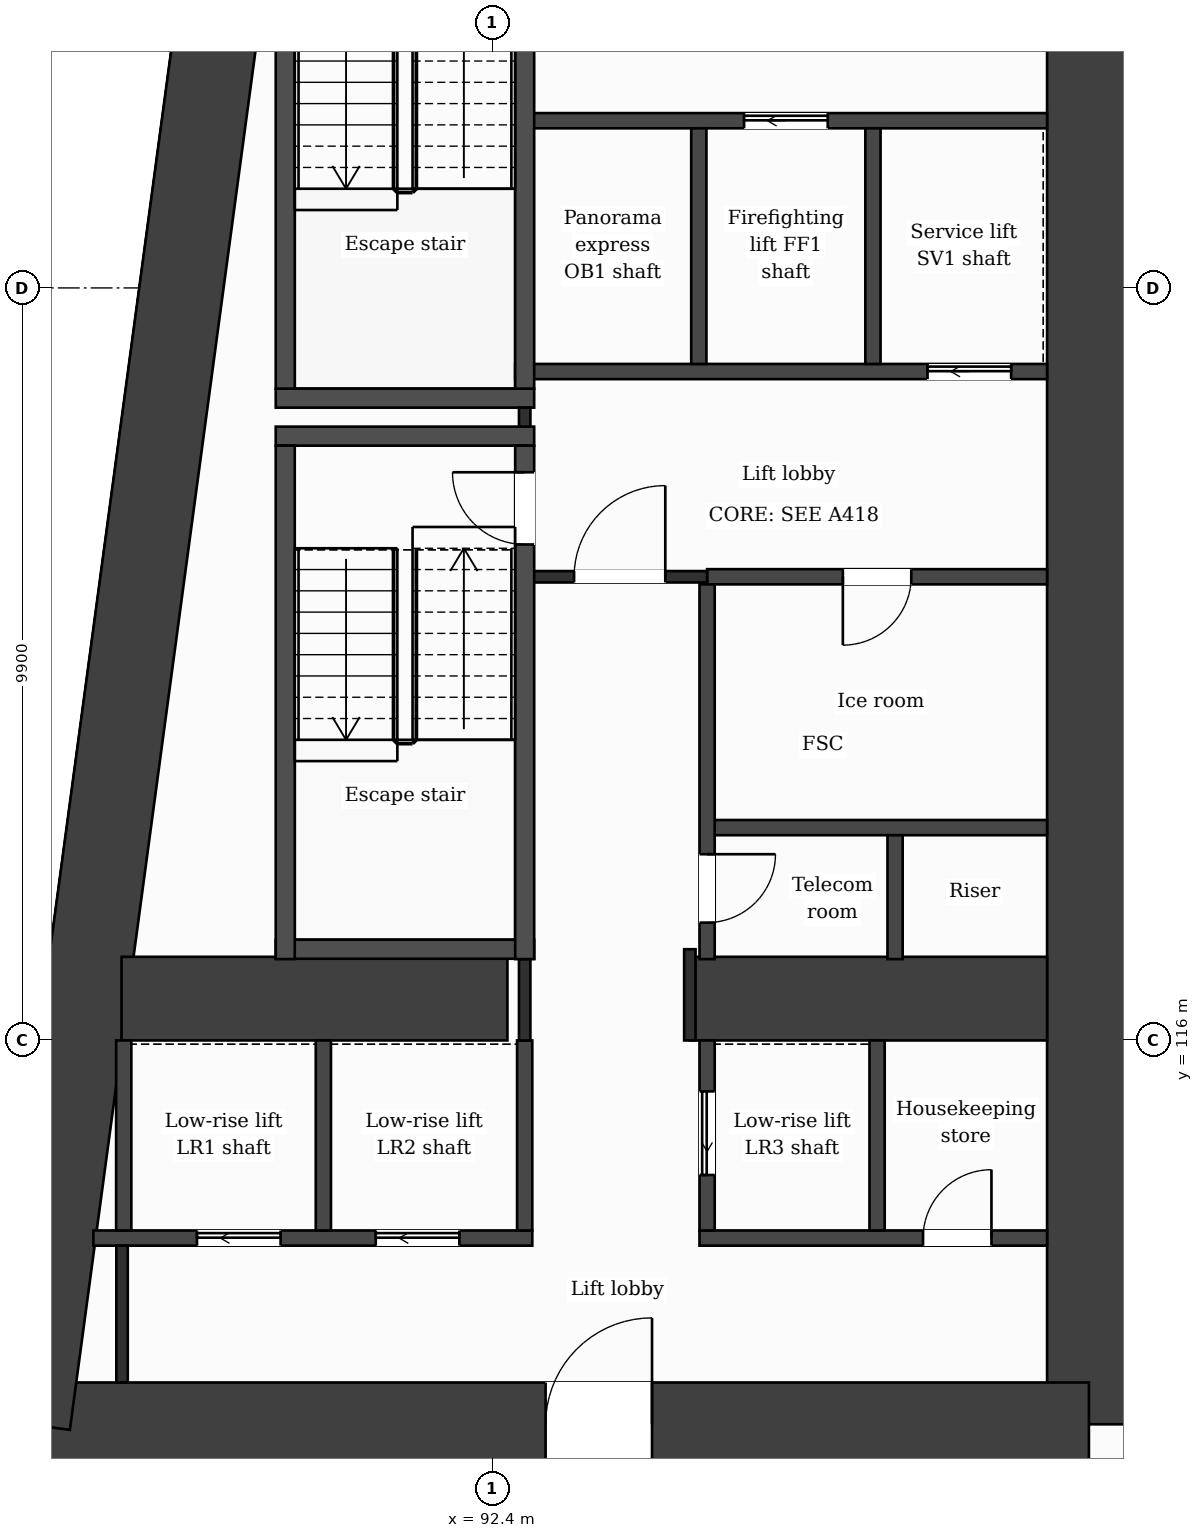
"""IFC4 building model, lengths in metres.
Left out: names, types, materials, properties, quantities, classifications, styles, units other than length and angle.
Written with IfcOpenShell. Run it as: python <this file> out.ifc"""

import sys

from ifc_helpers import new_model, si_unit, direction, frame, frame_2d, origin, place, context, subcontext, project, spatial, rectangle, extrude, element, fill, save


model = new_model("IFC4")
c1 = context("Model", 3, precision=1e-05, world=origin(), true_north=direction((0.0, 1.0)))
c2 = subcontext(c1, "Body", "Model", "MODEL_VIEW")
j1 = project(units=[si_unit("LENGTHUNIT", "METRE"), si_unit("PLANEANGLEUNIT", "RADIAN")], contexts=[c1])
p1 = place(None, origin())
s1 = spatial("IfcSite", under=j1, at=p1, CompositionType="ELEMENT")
p2 = place(p1, origin())
s2 = spatial("IfcBuilding", under=s1, at=p2, CompositionType="ELEMENT")
p3 = place(p2, frame((0.0, 0.0, 77.5)))
s3 = spatial("IfcBuildingStorey", under=s2, at=p3, CompositionType="ELEMENT", Elevation=77.5)
p4 = place(p3, frame((100.25, 131.85, 0.0), z_axis=(0.0, 0.0, 1.0), x_axis=(0.0, -1.0, 0.0)))
e1 = element("IfcWall", 1, at=p4, inside=s3, PredefinedType="SHEAR", context=c2, shape_type="SweptSolid", body=[
    extrude(rectangle(XDim=20.9, YDim=1.1, at=frame_2d((10.45, 0.0))), origin(), (0.0, 0.0, 1.0), 3.5),
])
p5 = place(p3, frame((100.25, 110.95, 0.0), z_axis=(0.0, 0.0, 1.0), x_axis=(-1.0, 0.0, 0.0)))
e2 = element("IfcWall", 2, at=p5, inside=s3, PredefinedType="SHEAR", context=c2, shape_type="SweptSolid", body=[
    extrude(rectangle(XDim=13.952, YDim=1.1, at=frame_2d((6.976, 0.0))), origin(), (0.0, 0.0, 1.0), 3.5),
])
p6 = place(p5, frame((5.748, 0.0, 0.0)))
e3 = element("IfcOpeningElement", 3, at=p6, cuts=e2, PredefinedType="OPENING", context=c2, shape_type="SweptSolid", body=[
    extrude(rectangle(XDim=1.4, YDim=2.1, at=frame_2d((0.7, 1.05))), frame((0.0, 0.56, 0.0), z_axis=(0.0, -1.0, 0.0), x_axis=(1.0, 0.0, 0.0)), (0.0, 0.0, 1.0), 1.12),
])
p7 = place(p3, frame((86.298, 110.95, 0.0), z_axis=(0.0, 0.0, 1.0), x_axis=(0.133400422634, 0.99106222168, 0.0)))
e4 = element("IfcWall", 4, at=p7, inside=s3, PredefinedType="SHEAR", context=c2, shape_type="SweptSolid", body=[
    extrude(rectangle(XDim=21.089, YDim=1.1, at=frame_2d((10.544, 0.0))), origin(), (0.0, 0.0, 1.0), 3.5),
])
p8 = place(p3, frame((87.523, 116.55, 0.0), z_axis=(0.0, 0.0, 1.0), x_axis=(1.0, 0.0, 0.0)))
e5 = element("IfcWall", 5, at=p8, inside=s3, PredefinedType="SHEAR", context=c2, shape_type="SweptSolid", body=[
    extrude(rectangle(XDim=5.077, YDim=1.1, at=frame_2d((2.539, 0.0))), origin(), (0.0, 0.0, 1.0), 3.5),
])
p9 = place(p3, frame((95.0, 116.55, 0.0), z_axis=(0.0, 0.0, 1.0), x_axis=(1.0, 0.0, 0.0)))
e6 = element("IfcWall", 6, at=p9, inside=s3, PredefinedType="SHEAR", context=c2, shape_type="SweptSolid", body=[
    extrude(rectangle(XDim=4.7, YDim=1.1, at=frame_2d((2.35, 0.0))), origin(), (0.0, 0.0, 1.0), 3.5),
])
p10 = place(p3, frame((87.153, 113.4, 0.0), z_axis=(0.0, 0.0, 1.0), x_axis=(1.0, 0.0, 0.0)))
e7 = element("IfcWall", 7, at=p10, inside=s3, PredefinedType="PARTITIONING", context=c2, shape_type="SweptSolid", body=[
    extrude(rectangle(XDim=5.774, YDim=0.2, at=frame_2d((2.887, 0.0))), origin(), (0.0, 0.0, 1.0), 3.0),
])
p11 = place(p10, frame((1.363, 0.0, 0.0)))
e8 = element("IfcOpeningElement", 8, at=p11, cuts=e7, PredefinedType="OPENING", context=c2, shape_type="SweptSolid", body=[
    extrude(rectangle(XDim=1.1, YDim=2.1, at=frame_2d((0.55, 1.05))), frame((0.0, 0.11, 0.0), z_axis=(0.0, -1.0, 0.0), x_axis=(1.0, 0.0, 0.0)), (0.0, 0.0, 1.0), 0.22),
])
p12 = place(p10, frame((3.715, 0.0, 0.0)))
e9 = element("IfcOpeningElement", 9, at=p12, cuts=e7, PredefinedType="OPENING", context=c2, shape_type="SweptSolid", body=[
    extrude(rectangle(XDim=1.1, YDim=2.1, at=frame_2d((0.55, 1.05))), frame((0.0, 0.11, 0.0), z_axis=(0.0, -1.0, 0.0), x_axis=(1.0, 0.0, 0.0)), (0.0, 0.0, 1.0), 0.22),
])
p13 = place(p3, frame((95.127, 113.4, 0.0), z_axis=(0.0, 0.0, 1.0), x_axis=(1.0, 0.0, 0.0)))
e10 = element("IfcWall", 10, at=p13, inside=s3, PredefinedType="PARTITIONING", context=c2, shape_type="SweptSolid", body=[
    extrude(rectangle(XDim=4.573, YDim=0.2, at=frame_2d((2.287, 0.0))), origin(), (0.0, 0.0, 1.0), 3.0),
])
p14 = place(p13, frame((2.941, 0.0, 0.0)))
e11 = element("IfcOpeningElement", 11, at=p14, cuts=e10, PredefinedType="OPENING", context=c2, shape_type="SweptSolid", body=[
    extrude(rectangle(XDim=0.9, YDim=2.1, at=frame_2d((0.45, 1.05))), frame((0.0, 0.11, 0.0), z_axis=(0.0, -1.0, 0.0), x_axis=(1.0, 0.0, 0.0)), (0.0, 0.0, 1.0), 0.22),
])
p15 = place(p3, frame((89.552, 117.2, 0.0), z_axis=(0.0, 0.0, 1.0), x_axis=(1.0, 0.0, 0.0)))
e12 = element("IfcWall", 12, at=p15, inside=s3, PredefinedType="PARTITIONING", context=c2, shape_type="SweptSolid", body=[
    extrude(rectangle(XDim=3.4, YDim=0.25, at=frame_2d((1.7, 0.0))), origin(), (0.0, 0.0, 1.0), 3.0),
])
p16 = place(p3, frame((95.227, 118.8, 0.0), z_axis=(0.0, 0.0, 1.0), x_axis=(1.0, 0.0, 0.0)))
e13 = element("IfcWall", 13, at=p16, inside=s3, PredefinedType="PARTITIONING", context=c2, shape_type="SweptSolid", body=[
    extrude(rectangle(XDim=4.473, YDim=0.2, at=frame_2d((2.236, 0.0))), origin(), (0.0, 0.0, 1.0), 3.0),
])
p17 = place(p3, frame((95.227, 122.1, 0.0), z_axis=(0.0, 0.0, 1.0), x_axis=(1.0, 0.0, 0.0)))
e14 = element("IfcWall", 14, at=p17, inside=s3, PredefinedType="PARTITIONING", context=c2, shape_type="SweptSolid", body=[
    extrude(rectangle(XDim=4.473, YDim=0.2, at=frame_2d((2.236, 0.0))), origin(), (0.0, 0.0, 1.0), 3.0),
])
p18 = place(p17, frame((1.786, 0.0, 0.0)))
e15 = element("IfcOpeningElement", 15, at=p18, cuts=e14, PredefinedType="OPENING", context=c2, shape_type="SweptSolid", body=[
    extrude(rectangle(XDim=0.9, YDim=2.1, at=frame_2d((0.45, 1.05))), frame((0.0, 0.11, 0.0), z_axis=(0.0, -1.0, 0.0), x_axis=(1.0, 0.0, 0.0)), (0.0, 0.0, 1.0), 0.22),
])
p19 = place(p3, frame((92.827, 122.1, 0.0), z_axis=(0.0, 0.0, 1.0), x_axis=(1.0, 0.0, 0.0)))
e16 = element("IfcWall", 16, at=p19, inside=s3, PredefinedType="PARTITIONING", context=c2, shape_type="SweptSolid", body=[
    extrude(rectangle(XDim=2.4, YDim=0.15, at=frame_2d((1.2, 0.0))), origin(), (0.0, 0.0, 1.0), 3.0),
])
p20 = place(p19, frame((0.65, 0.0, 0.0)))
e17 = element("IfcOpeningElement", 17, at=p20, cuts=e16, PredefinedType="OPENING", context=c2, shape_type="SweptSolid", body=[
    extrude(rectangle(XDim=1.2, YDim=2.1, at=frame_2d((0.6, 1.05))), frame((0.0, 0.085, 0.0), z_axis=(0.0, -1.0, 0.0), x_axis=(1.0, 0.0, 0.0)), (0.0, 0.0, 1.0), 0.17),
])
for number, where, z_axis, x_axis in (
    (18, (89.552, 123.95, 0.0), (0.0, 0.0, 1.0), (1.0, 0.0, 0.0)),
    (19, (89.552, 124.45, 0.0), (0.0, 0.0, 1.0), (1.0, 0.0, 0.0)),
):
    element("IfcWall", number, at=place(p3, frame(where, z_axis=z_axis, x_axis=x_axis)), inside=s3, PredefinedType="PARTITIONING", context=c2, shape_type="SweptSolid", body=[
        extrude(rectangle(XDim=3.4, YDim=0.25, at=frame_2d((1.7, 0.0))), origin(), (0.0, 0.0, 1.0), 3.0),
    ])
p21 = place(p3, frame((92.702, 124.8, 0.0), z_axis=(0.0, 0.0, 1.0), x_axis=(1.0, 0.0, 0.0)))
e20 = element("IfcWall", 20, at=p21, inside=s3, PredefinedType="PARTITIONING", context=c2, shape_type="SweptSolid", body=[
    extrude(rectangle(XDim=6.998, YDim=0.2, at=frame_2d((3.499, 0.0))), origin(), (0.0, 0.0, 1.0), 3.0),
])
p22 = place(p21, frame((5.425, 0.0, 0.0)))
e21 = element("IfcOpeningElement", 21, at=p22, cuts=e20, PredefinedType="OPENING", context=c2, shape_type="SweptSolid", body=[
    extrude(rectangle(XDim=1.1, YDim=2.1, at=frame_2d((0.55, 1.05))), frame((0.0, 0.11, 0.0), z_axis=(0.0, -1.0, 0.0), x_axis=(1.0, 0.0, 0.0)), (0.0, 0.0, 1.0), 0.22),
])
p23 = place(p3, frame((92.827, 128.1, 0.0), z_axis=(0.0, 0.0, 1.0), x_axis=(1.0, 0.0, 0.0)))
e22 = element("IfcWall", 22, at=p23, inside=s3, PredefinedType="PARTITIONING", context=c2, shape_type="SweptSolid", body=[
    extrude(rectangle(XDim=6.873, YDim=0.2, at=frame_2d((3.437, 0.0))), origin(), (0.0, 0.0, 1.0), 3.0),
])
p24 = place(p23, frame((2.887, 0.0, 0.0)))
e23 = element("IfcOpeningElement", 23, at=p24, cuts=e22, PredefinedType="OPENING", context=c2, shape_type="SweptSolid", body=[
    extrude(rectangle(XDim=1.1, YDim=2.1, at=frame_2d((0.55, 1.05))), frame((0.0, 0.11, 0.0), z_axis=(0.0, -1.0, 0.0), x_axis=(1.0, 0.0, 0.0)), (0.0, 0.0, 1.0), 0.22),
])
p25 = place(p3, frame((87.552, 113.5, 0.0), z_axis=(0.0, 0.0, 1.0), x_axis=(0.0, 1.0, 0.0)))
e24 = element("IfcWall", 24, at=p25, inside=s3, PredefinedType="PARTITIONING", context=c2, shape_type="SweptSolid", body=[
    extrude(rectangle(XDim=2.5, YDim=0.2, at=frame_2d((1.25, 0.0))), origin(), (0.0, 0.0, 1.0), 3.0),
])
p26 = place(p3, frame((87.53, 111.5, 0.0), z_axis=(0.0, 0.0, 1.0), x_axis=(0.0, 1.0, 0.0)))
e25 = element("IfcWall", 25, at=p26, inside=s3, PredefinedType="PARTITIONING", context=c2, shape_type="SweptSolid", body=[
    extrude(rectangle(XDim=1.8, YDim=0.15, at=frame_2d((0.9, 0.0))), origin(), (0.0, 0.0, 1.0), 3.0),
])
p27 = place(p3, frame((89.677, 117.07, 0.0), z_axis=(0.0, 0.0, 1.0), x_axis=(0.0, 1.0, 0.0)))
e26 = element("IfcWall", 26, at=p27, inside=s3, PredefinedType="PARTITIONING", context=c2, shape_type="SweptSolid", body=[
    extrude(rectangle(XDim=6.755, YDim=0.25, at=frame_2d((3.377, 0.0))), origin(), (0.0, 0.0, 1.0), 3.0),
])
p28 = place(p3, frame((89.677, 124.575, 0.0), z_axis=(0.0, 0.0, 1.0), x_axis=(0.0, 1.0, 0.0)))
e27 = element("IfcWall", 27, at=p28, inside=s3, PredefinedType="PARTITIONING", context=c2, shape_type="SweptSolid", body=[
    extrude(rectangle(XDim=6.5, YDim=0.25, at=frame_2d((3.25, 0.0))), origin(), (0.0, 0.0, 1.0), 3.0),
])
for number, where, z_axis, x_axis in (
    (28, (90.178, 113.5, 0.0), (0.0, 0.0, 1.0), (0.0, 1.0, 0.0)),
    (29, (92.827, 113.5, 0.0), (0.0, 0.0, 1.0), (0.0, 1.0, 0.0)),
):
    element("IfcWall", number, at=place(p3, frame(where, z_axis=z_axis, x_axis=x_axis)), inside=s3, PredefinedType="PARTITIONING", context=c2, shape_type="SweptSolid", body=[
        extrude(rectangle(XDim=2.5, YDim=0.2, at=frame_2d((1.25, 0.0))), origin(), (0.0, 0.0, 1.0), 3.0),
    ])
p29 = place(p3, frame((92.827, 116.0, 0.0), z_axis=(0.0, 0.0, 1.0), x_axis=(0.0, 1.0, 0.0)))
e30 = element("IfcWall", 30, at=p29, inside=s3, PredefinedType="PARTITIONING", context=c2, shape_type="SweptSolid", body=[
    extrude(rectangle(XDim=1.07, YDim=0.15, at=frame_2d((0.535, 0.0))), origin(), (0.0, 0.0, 1.0), 3.0),
])
p30 = place(p3, frame((92.827, 124.075, 0.0), z_axis=(0.0, 0.0, 1.0), x_axis=(0.0, 1.0, 0.0)))
e31 = element("IfcWall", 31, at=p30, inside=s3, PredefinedType="PARTITIONING", context=c2, shape_type="SweptSolid", body=[
    extrude(rectangle(XDim=0.25, YDim=0.15, at=frame_2d((0.125, 0.0))), origin(), (0.0, 0.0, 1.0), 3.0),
])
p31 = place(p3, frame((92.827, 117.07, 0.0), z_axis=(0.0, 0.0, 1.0), x_axis=(0.0, 1.0, 0.0)))
e32 = element("IfcWall", 32, at=p31, inside=s3, PredefinedType="PARTITIONING", context=c2, shape_type="SweptSolid", body=[
    extrude(rectangle(XDim=6.755, YDim=0.25, at=frame_2d((3.377, 0.0))), origin(), (0.0, 0.0, 1.0), 3.0),
])
p32 = place(p31, frame((5.455, 0.0, 0.0)))
e33 = element("IfcOpeningElement", 33, at=p32, cuts=e32, PredefinedType="OPENING", context=c2, shape_type="SweptSolid", body=[
    extrude(rectangle(XDim=0.95, YDim=2.1, at=frame_2d((0.475, 1.05))), frame((0.0, 0.135, 0.0), z_axis=(0.0, -1.0, 0.0), x_axis=(1.0, 0.0, 0.0)), (0.0, 0.0, 1.0), 0.27),
])
p33 = place(p3, frame((92.827, 124.575, 0.0), z_axis=(0.0, 0.0, 1.0), x_axis=(0.0, 1.0, 0.0)))
e34 = element("IfcWall", 34, at=p33, inside=s3, PredefinedType="PARTITIONING", context=c2, shape_type="SweptSolid", body=[
    extrude(rectangle(XDim=6.755, YDim=0.25, at=frame_2d((3.377, 0.0))), origin(), (0.0, 0.0, 1.0), 3.0),
])
p34 = place(p33, frame((5.325, 0.0, 0.0)))
e35 = element("IfcOpeningElement", 35, at=p34, cuts=e34, PredefinedType="OPENING", context=c2, shape_type="SweptSolid", body=[
    extrude(rectangle(XDim=1.0, YDim=2.1, at=frame_2d((0.5, 1.05))), frame((0.0, 0.135, 0.0), z_axis=(0.0, -1.0, 0.0), x_axis=(1.0, 0.0, 0.0)), (0.0, 0.0, 1.0), 0.27),
])
p35 = place(p3, frame((95.0, 116.0, 0.0), z_axis=(0.0, 0.0, 1.0), x_axis=(0.0, 1.0, 0.0)))
e36 = element("IfcWall", 36, at=p35, inside=s3, PredefinedType="PARTITIONING", context=c2, shape_type="SweptSolid", body=[
    extrude(rectangle(XDim=1.2, YDim=0.15, at=frame_2d((0.6, 0.0))), origin(), (0.0, 0.0, 1.0), 3.0),
])
p36 = place(p3, frame((95.118, 124.9, 0.0), z_axis=(0.0, 0.0, 1.0), x_axis=(0.0, 1.0, 0.0)))
e37 = element("IfcWall", 37, at=p36, inside=s3, PredefinedType="PARTITIONING", context=c2, shape_type="SweptSolid", body=[
    extrude(rectangle(XDim=3.1, YDim=0.2, at=frame_2d((1.55, 0.0))), origin(), (0.0, 0.0, 1.0), 3.0),
])
p37 = place(p3, frame((95.227, 113.5, 0.0), z_axis=(0.0, 0.0, 1.0), x_axis=(0.0, 1.0, 0.0)))
e38 = element("IfcWall", 38, at=p37, inside=s3, PredefinedType="PARTITIONING", context=c2, shape_type="SweptSolid", body=[
    extrude(rectangle(XDim=2.5, YDim=0.2, at=frame_2d((1.25, 0.0))), origin(), (0.0, 0.0, 1.0), 3.0),
])
p38 = place(p37, frame((0.73, 0.0, 0.0)))
e39 = element("IfcOpeningElement", 39, at=p38, cuts=e38, PredefinedType="OPENING", context=c2, shape_type="SweptSolid", body=[
    extrude(rectangle(XDim=1.1, YDim=2.1, at=frame_2d((0.55, 1.05))), frame((0.0, 0.11, 0.0), z_axis=(0.0, -1.0, 0.0), x_axis=(1.0, 0.0, 0.0)), (0.0, 0.0, 1.0), 0.22),
])
p39 = place(p3, frame((95.227, 117.07, 0.0), z_axis=(0.0, 0.0, 1.0), x_axis=(0.0, 1.0, 0.0)))
e40 = element("IfcWall", 40, at=p39, inside=s3, PredefinedType="PARTITIONING", context=c2, shape_type="SweptSolid", body=[
    extrude(rectangle(XDim=4.93, YDim=0.2, at=frame_2d((2.465, 0.0))), origin(), (0.0, 0.0, 1.0), 3.0),
])
p40 = place(p39, frame((0.48, 0.0, 0.0)))
e41 = element("IfcOpeningElement", 41, at=p40, cuts=e40, PredefinedType="OPENING", context=c2, shape_type="SweptSolid", body=[
    extrude(rectangle(XDim=0.9, YDim=2.1, at=frame_2d((0.45, 1.05))), frame((0.0, 0.11, 0.0), z_axis=(0.0, -1.0, 0.0), x_axis=(1.0, 0.0, 0.0)), (0.0, 0.0, 1.0), 0.22),
])
p41 = place(p3, frame((97.409, 124.9, 0.0), z_axis=(0.0, 0.0, 1.0), x_axis=(0.0, 1.0, 0.0)))
e42 = element("IfcWall", 42, at=p41, inside=s3, PredefinedType="PARTITIONING", context=c2, shape_type="SweptSolid", body=[
    extrude(rectangle(XDim=3.1, YDim=0.2, at=frame_2d((1.55, 0.0))), origin(), (0.0, 0.0, 1.0), 3.0),
])
p42 = place(p3, frame((97.463, 113.5, 0.0), z_axis=(0.0, 0.0, 1.0), x_axis=(0.0, 1.0, 0.0)))
e43 = element("IfcWall", 43, at=p42, inside=s3, PredefinedType="PARTITIONING", context=c2, shape_type="SweptSolid", body=[
    extrude(rectangle(XDim=2.5, YDim=0.2, at=frame_2d((1.25, 0.0))), origin(), (0.0, 0.0, 1.0), 3.0),
])
p43 = place(p3, frame((97.7, 117.07, 0.0), z_axis=(0.0, 0.0, 1.0), x_axis=(0.0, 1.0, 0.0)))
e44 = element("IfcWall", 44, at=p43, inside=s3, PredefinedType="PARTITIONING", context=c2, shape_type="SweptSolid", body=[
    extrude(rectangle(XDim=1.63, YDim=0.2, at=frame_2d((0.815, 0.0))), origin(), (0.0, 0.0, 1.0), 3.0),
])
p44 = place(p20, origin())
e45 = element("IfcDoor", 45, at=p44, inside=s3, OperationType="SINGLE_SWING_RIGHT", PredefinedType="DOOR", context=c2, shape_type="SweptSolid", body=[
    extrude(rectangle(XDim=1.2, YDim=2.1, at=frame_2d((0.6, 1.05))), frame((0.0, 0.025, 0.0), z_axis=(0.0, -1.0, 0.0), x_axis=(1.0, 0.0, 0.0)), (0.0, 0.0, 1.0), 0.05),
])
fill(e17, e45)
p45 = place(p24, origin())
e46 = element("IfcDoor", 46, at=p45, inside=s3, OperationType="SLIDING_TO_LEFT", PredefinedType="DOOR", context=c2, shape_type="SweptSolid", body=[
    extrude(rectangle(XDim=1.1, YDim=2.1, at=frame_2d((0.55, 1.05))), frame((0.0, 0.025, 0.0), z_axis=(0.0, -1.0, 0.0), x_axis=(1.0, 0.0, 0.0)), (0.0, 0.0, 1.0), 0.05),
])
fill(e23, e46)
p46 = place(p22, origin())
e47 = element("IfcDoor", 47, at=p46, inside=s3, OperationType="SLIDING_TO_LEFT", PredefinedType="DOOR", context=c2, shape_type="SweptSolid", body=[
    extrude(rectangle(XDim=1.1, YDim=2.1, at=frame_2d((0.55, 1.05))), frame((0.0, 0.025, 0.0), z_axis=(0.0, -1.0, 0.0), x_axis=(1.0, 0.0, 0.0)), (0.0, 0.0, 1.0), 0.05),
])
fill(e21, e47)
p47 = place(p18, origin())
e48 = element("IfcDoor", 48, at=p47, inside=s3, OperationType="SINGLE_SWING_LEFT", PredefinedType="DOOR", context=c2, shape_type="SweptSolid", body=[
    extrude(rectangle(XDim=0.9, YDim=2.1, at=frame_2d((0.45, 1.05))), frame((0.0, 0.025, 0.0), z_axis=(0.0, -1.0, 0.0), x_axis=(1.0, 0.0, 0.0)), (0.0, 0.0, 1.0), 0.05),
])
fill(e15, e48)
p48 = place(p32, origin())
e49 = element("IfcDoor", 49, at=p48, inside=s3, OperationType="SINGLE_SWING_RIGHT", PredefinedType="DOOR", context=c2, shape_type="SweptSolid", body=[
    extrude(rectangle(XDim=0.95, YDim=2.1, at=frame_2d((0.475, 1.05))), frame((0.0, 0.025, 0.0), z_axis=(0.0, -1.0, 0.0), x_axis=(1.0, 0.0, 0.0)), (0.0, 0.0, 1.0), 0.05),
])
fill(e33, e49)
p49 = place(p40, origin())
e50 = element("IfcDoor", 50, at=p49, inside=s3, OperationType="SINGLE_SWING_RIGHT", PredefinedType="DOOR", context=c2, shape_type="SweptSolid", body=[
    extrude(rectangle(XDim=0.9, YDim=2.1, at=frame_2d((0.45, 1.05))), frame((0.0, 0.025, 0.0), z_axis=(0.0, -1.0, 0.0), x_axis=(1.0, 0.0, 0.0)), (0.0, 0.0, 1.0), 0.05),
])
fill(e41, e50)
p50 = place(p11, origin())
e51 = element("IfcDoor", 51, at=p50, inside=s3, OperationType="SLIDING_TO_LEFT", PredefinedType="DOOR", context=c2, shape_type="SweptSolid", body=[
    extrude(rectangle(XDim=1.1, YDim=2.1, at=frame_2d((0.55, 1.05))), frame((0.0, 0.025, 0.0), z_axis=(0.0, -1.0, 0.0), x_axis=(1.0, 0.0, 0.0)), (0.0, 0.0, 1.0), 0.05),
])
fill(e8, e51)
p51 = place(p12, origin())
e52 = element("IfcDoor", 52, at=p51, inside=s3, OperationType="SLIDING_TO_LEFT", PredefinedType="DOOR", context=c2, shape_type="SweptSolid", body=[
    extrude(rectangle(XDim=1.1, YDim=2.1, at=frame_2d((0.55, 1.05))), frame((0.0, 0.025, 0.0), z_axis=(0.0, -1.0, 0.0), x_axis=(1.0, 0.0, 0.0)), (0.0, 0.0, 1.0), 0.05),
])
fill(e9, e52)
p52 = place(p38, origin())
e53 = element("IfcDoor", 53, at=p52, inside=s3, OperationType="SLIDING_TO_LEFT", PredefinedType="DOOR", context=c2, shape_type="SweptSolid", body=[
    extrude(rectangle(XDim=1.1, YDim=2.1, at=frame_2d((0.55, 1.05))), frame((0.0, 0.025, 0.0), z_axis=(0.0, -1.0, 0.0), x_axis=(1.0, 0.0, 0.0)), (0.0, 0.0, 1.0), 0.05),
])
fill(e39, e53)
p53 = place(p14, origin())
e54 = element("IfcDoor", 54, at=p53, inside=s3, OperationType="SINGLE_SWING_RIGHT", PredefinedType="DOOR", context=c2, shape_type="SweptSolid", body=[
    extrude(rectangle(XDim=0.9, YDim=2.1, at=frame_2d((0.45, 1.05))), frame((0.0, 0.025, 0.0), z_axis=(0.0, -1.0, 0.0), x_axis=(1.0, 0.0, 0.0)), (0.0, 0.0, 1.0), 0.05),
])
fill(e11, e54)
p54 = place(p6, origin())
e55 = element("IfcDoor", 55, at=p54, inside=s3, OperationType="SINGLE_SWING_LEFT", PredefinedType="DOOR", context=c2, shape_type="SweptSolid", body=[
    extrude(rectangle(XDim=1.4, YDim=2.1, at=frame_2d((0.7, 1.05))), frame((0.0, 0.025, 0.0), z_axis=(0.0, -1.0, 0.0), x_axis=(1.0, 0.0, 0.0)), (0.0, 0.0, 1.0), 0.05),
])
fill(e3, e55)
save(model, sys.argv[1])
